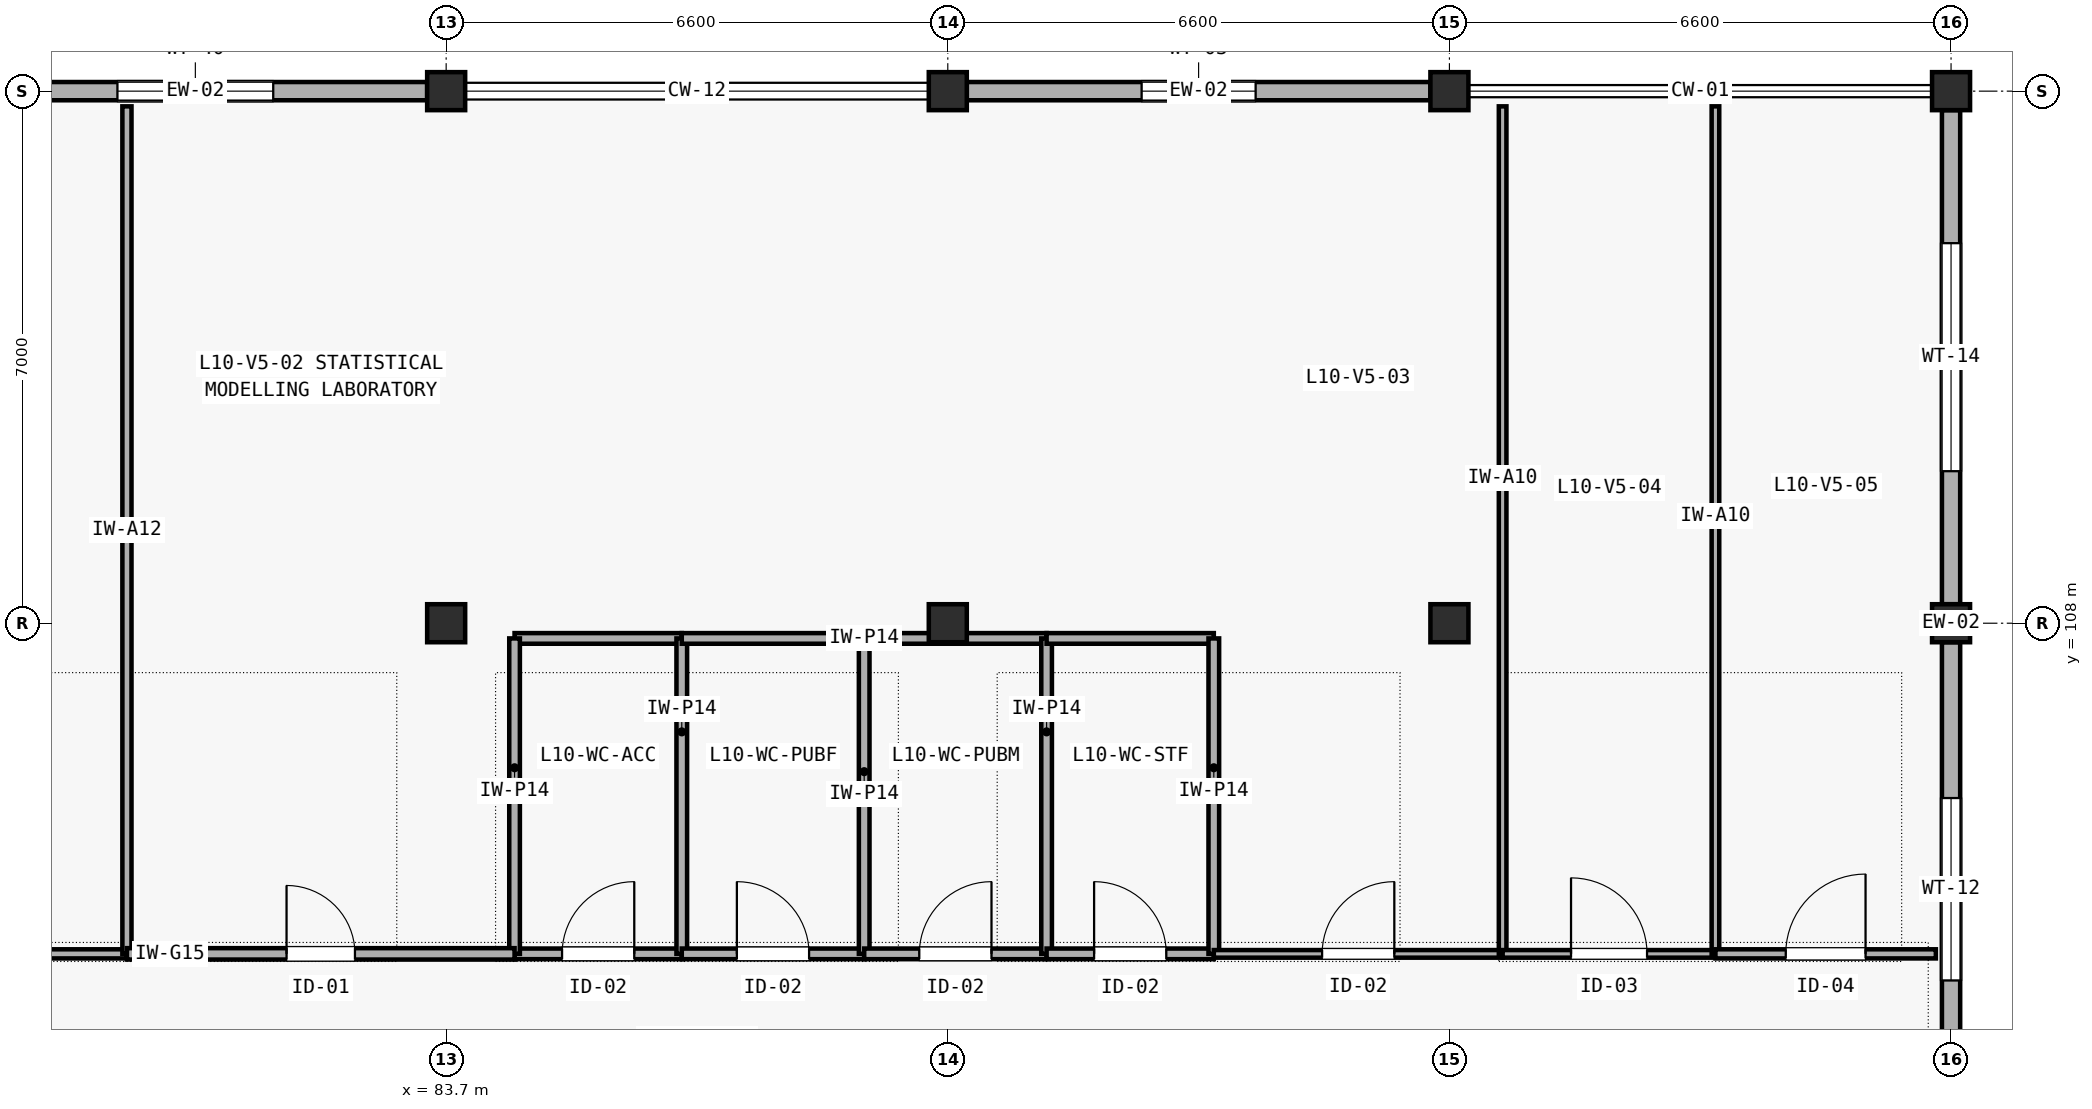
"""IFC4 building model, lengths in metres.
Left out: names, types, materials, properties, quantities, classifications, styles, units other than length and angle.
Written with IfcOpenShell. Run it as: python <this file> out.ifc"""

import sys

from ifc_helpers import new_model, si_unit, direction, frame, frame_2d, origin, origin_2d, place, context, subcontext, project, spatial, rectangle, extrude, element, fill, save


model = new_model("IFC4")
c1 = context("Model", 3, precision=1e-05, world=origin(), true_north=direction((0.0, 1.0)))
c2 = subcontext(c1, "Body", "Model", "MODEL_VIEW")
j1 = project(units=[si_unit("LENGTHUNIT", "METRE"), si_unit("PLANEANGLEUNIT", "RADIAN")], contexts=[c1])
p1 = place(None, origin())
s1 = spatial("IfcSite", under=j1, at=p1, CompositionType="ELEMENT")
p2 = place(p1, origin())
s2 = spatial("IfcBuilding", under=s1, at=p2, CompositionType="ELEMENT")
p3 = place(p2, frame((0.0, 0.0, 42.0)))
s3 = spatial("IfcBuildingStorey", under=s2, at=p3, CompositionType="ELEMENT", Elevation=42.0)
for number, where, z_axis, x_axis in (
    (1, (83.7, 108.0, 0.0), (0.0, 0.0, 1.0), (1.0, 0.0, 0.0)),
    (2, (83.7, 115.0, 0.0), (0.0, 0.0, 1.0), (1.0, 0.0, 0.0)),
    (3, (90.3, 108.0, 0.0), (0.0, 0.0, 1.0), (1.0, 0.0, 0.0)),
    (4, (90.3, 115.0, 0.0), (0.0, 0.0, 1.0), (1.0, 0.0, 0.0)),
    (5, (96.9, 108.0, 0.0), (0.0, 0.0, 1.0), (1.0, 0.0, 0.0)),
    (6, (96.9, 115.0, 0.0), (0.0, 0.0, 1.0), (1.0, 0.0, 0.0)),
    (7, (103.5, 108.0, 0.0), (0.0, 0.0, 1.0), (1.0, 0.0, 0.0)),
    (8, (103.5, 115.0, 0.0), (0.0, 0.0, 1.0), (1.0, 0.0, 0.0)),
):
    element("IfcColumn", number, at=place(p3, frame(where, z_axis=z_axis, x_axis=x_axis)), inside=s3, PredefinedType="COLUMN", context=c2, shape_type="SweptSolid", body=[
        extrude(rectangle(XDim=0.5, YDim=0.5, at=origin_2d()), origin(), (0.0, 0.0, 1.0), 4.2),
    ])
p4 = place(p3, frame((77.35, 115.0, 0.0), z_axis=(0.0, 0.0, 1.0), x_axis=(1.0, 0.0, 0.0)))
e9 = element("IfcWall", 9, at=p4, inside=s3, PredefinedType="SOLIDWALL", context=c2, shape_type="SweptSolid", body=[
    extrude(rectangle(XDim=6.1, YDim=0.24, at=frame_2d((3.05, 0.0))), origin(), (0.0, 0.0, 1.0), 3.385),
])
p5 = place(p4, frame((2.025, 0.0, 0.85)))
e10 = element("IfcOpeningElement", 10, at=p5, cuts=e9, PredefinedType="OPENING", context=c2, shape_type="SweptSolid", body=[
    extrude(rectangle(XDim=2.05, YDim=1.55, at=frame_2d((1.025, 0.775))), frame((0.0, 0.13, 0.0), z_axis=(0.0, -1.0, 0.0), x_axis=(1.0, 0.0, 0.0)), (0.0, 0.0, 1.0), 0.26),
])
p6 = place(p3, frame((90.55, 115.0, 0.0), z_axis=(0.0, 0.0, 1.0), x_axis=(1.0, 0.0, 0.0)))
e11 = element("IfcWall", 11, at=p6, inside=s3, PredefinedType="SOLIDWALL", context=c2, shape_type="SweptSolid", body=[
    extrude(rectangle(XDim=6.1, YDim=0.24, at=frame_2d((3.05, 0.0))), origin(), (0.0, 0.0, 1.0), 3.345),
])
p7 = place(p6, frame((2.3, 0.0, 0.85)))
e12 = element("IfcOpeningElement", 12, at=p7, cuts=e11, PredefinedType="OPENING", context=c2, shape_type="SweptSolid", body=[
    extrude(rectangle(XDim=1.5, YDim=1.35, at=frame_2d((0.75, 0.675))), frame((0.0, 0.13, 0.0), z_axis=(0.0, -1.0, 0.0), x_axis=(1.0, 0.0, 0.0)), (0.0, 0.0, 1.0), 0.26),
])
p8 = place(p3, frame((103.5, 101.25, 0.0), z_axis=(0.0, 0.0, 1.0), x_axis=(0.0, 1.0, 0.0)))
e13 = element("IfcWall", 13, at=p8, inside=s3, PredefinedType="SOLIDWALL", context=c2, shape_type="SweptSolid", body=[
    extrude(rectangle(XDim=6.5, YDim=0.24, at=frame_2d((3.25, 0.0))), origin(), (0.0, 0.0, 1.0), 3.505),
])
p9 = place(p8, frame((2.05, 0.0, 0.85)))
e14 = element("IfcOpeningElement", 14, at=p9, cuts=e13, PredefinedType="OPENING", context=c2, shape_type="SweptSolid", body=[
    extrude(rectangle(XDim=2.4, YDim=1.5, at=frame_2d((1.2, 0.75))), frame((0.0, 0.13, 0.0), z_axis=(0.0, -1.0, 0.0), x_axis=(1.0, 0.0, 0.0)), (0.0, 0.0, 1.0), 0.26),
])
p10 = place(p3, frame((103.5, 108.25, 0.0), z_axis=(0.0, 0.0, 1.0), x_axis=(0.0, 1.0, 0.0)))
e15 = element("IfcWall", 15, at=p10, inside=s3, PredefinedType="SOLIDWALL", context=c2, shape_type="SweptSolid", body=[
    extrude(rectangle(XDim=6.5, YDim=0.24, at=frame_2d((3.25, 0.0))), origin(), (0.0, 0.0, 1.0), 3.505),
])
p11 = place(p10, frame((1.75, 0.0, 0.85)))
e16 = element("IfcOpeningElement", 16, at=p11, cuts=e15, PredefinedType="OPENING", context=c2, shape_type="SweptSolid", body=[
    extrude(rectangle(XDim=3.0, YDim=1.5, at=frame_2d((1.5, 0.75))), frame((0.0, 0.13, 0.0), z_axis=(0.0, -1.0, 0.0), x_axis=(1.0, 0.0, 0.0)), (0.0, 0.0, 1.0), 0.26),
])
p12 = place(p3, frame((84.6, 103.65, 0.0), z_axis=(0.0, 0.0, 1.0), x_axis=(1.0, 0.0, 0.0)))
e17 = element("IfcWall", 17, at=p12, inside=s3, PredefinedType="PLUMBINGWALL", context=c2, shape_type="SweptSolid", body=[
    extrude(rectangle(XDim=2.2, YDim=0.14, at=frame_2d((1.1, 0.0))), origin(), (0.0, 0.0, 1.0), 3.9),
])
p13 = place(p12, frame((0.625, 0.0, 0.0)))
e18 = element("IfcOpeningElement", 18, at=p13, cuts=e17, PredefinedType="OPENING", context=c2, shape_type="SweptSolid", body=[
    extrude(rectangle(XDim=0.95, YDim=2.1, at=frame_2d((0.475, 1.05))), frame((0.0, 0.08, 0.0), z_axis=(0.0, -1.0, 0.0), x_axis=(1.0, 0.0, 0.0)), (0.0, 0.0, 1.0), 0.16),
])
p14 = place(p3, frame((84.6, 107.8, 0.0), z_axis=(0.0, 0.0, 1.0), x_axis=(1.0, 0.0, 0.0)))
e19 = element("IfcWall", 19, at=p14, inside=s3, PredefinedType="PLUMBINGWALL", context=c2, shape_type="SweptSolid", body=[
    extrude(rectangle(XDim=2.2, YDim=0.14, at=frame_2d((1.1, 0.0))), origin(), (0.0, 0.0, 1.0), 3.345),
])
for number, where, z_axis, x_axis in (
    (20, (84.6, 103.65, 0.0), (0.0, 0.0, 1.0), (0.0, 1.0, 0.0)),
    (21, (86.8, 103.65, 0.0), (0.0, 0.0, 1.0), (0.0, 1.0, 0.0)),
):
    element("IfcWall", number, at=place(p3, frame(where, z_axis=z_axis, x_axis=x_axis)), inside=s3, PredefinedType="PLUMBINGWALL", context=c2, shape_type="SweptSolid", body=[
        extrude(rectangle(XDim=4.15, YDim=0.14, at=frame_2d((2.075, 0.0))), origin(), (0.0, 0.0, 1.0), 3.9),
    ])
p15 = place(p3, frame((86.8, 103.65, 0.0), z_axis=(0.0, 0.0, 1.0), x_axis=(1.0, 0.0, 0.0)))
e22 = element("IfcWall", 22, at=p15, inside=s3, PredefinedType="PLUMBINGWALL", context=c2, shape_type="SweptSolid", body=[
    extrude(rectangle(XDim=2.4, YDim=0.14, at=frame_2d((1.2, 0.0))), origin(), (0.0, 0.0, 1.0), 3.9),
])
p16 = place(p15, frame((0.725, 0.0, 0.0)))
e23 = element("IfcOpeningElement", 23, at=p16, cuts=e22, PredefinedType="OPENING", context=c2, shape_type="SweptSolid", body=[
    extrude(rectangle(XDim=0.95, YDim=2.1, at=frame_2d((0.475, 1.05))), frame((0.0, 0.08, 0.0), z_axis=(0.0, -1.0, 0.0), x_axis=(1.0, 0.0, 0.0)), (0.0, 0.0, 1.0), 0.16),
])
p17 = place(p3, frame((86.8, 107.8, 0.0), z_axis=(0.0, 0.0, 1.0), x_axis=(1.0, 0.0, 0.0)))
e24 = element("IfcWall", 24, at=p17, inside=s3, PredefinedType="PLUMBINGWALL", context=c2, shape_type="SweptSolid", body=[
    extrude(rectangle(XDim=2.4, YDim=0.14, at=frame_2d((1.2, 0.0))), origin(), (0.0, 0.0, 1.0), 3.345),
])
p18 = place(p3, frame((89.2, 103.65, 0.0), z_axis=(0.0, 0.0, 1.0), x_axis=(0.0, 1.0, 0.0)))
e25 = element("IfcWall", 25, at=p18, inside=s3, PredefinedType="PLUMBINGWALL", context=c2, shape_type="SweptSolid", body=[
    extrude(rectangle(XDim=4.15, YDim=0.14, at=frame_2d((2.075, 0.0))), origin(), (0.0, 0.0, 1.0), 3.9),
])
p19 = place(p3, frame((89.2, 103.65, 0.0), z_axis=(0.0, 0.0, 1.0), x_axis=(1.0, 0.0, 0.0)))
e26 = element("IfcWall", 26, at=p19, inside=s3, PredefinedType="PLUMBINGWALL", context=c2, shape_type="SweptSolid", body=[
    extrude(rectangle(XDim=2.4, YDim=0.14, at=frame_2d((1.2, 0.0))), origin(), (0.0, 0.0, 1.0), 3.9),
])
p20 = place(p19, frame((0.725, 0.0, 0.0)))
e27 = element("IfcOpeningElement", 27, at=p20, cuts=e26, PredefinedType="OPENING", context=c2, shape_type="SweptSolid", body=[
    extrude(rectangle(XDim=0.95, YDim=2.1, at=frame_2d((0.475, 1.05))), frame((0.0, 0.08, 0.0), z_axis=(0.0, -1.0, 0.0), x_axis=(1.0, 0.0, 0.0)), (0.0, 0.0, 1.0), 0.16),
])
p21 = place(p3, frame((89.2, 107.8, 0.0), z_axis=(0.0, 0.0, 1.0), x_axis=(1.0, 0.0, 0.0)))
e28 = element("IfcWall", 28, at=p21, inside=s3, PredefinedType="PLUMBINGWALL", context=c2, shape_type="SweptSolid", body=[
    extrude(rectangle(XDim=2.4, YDim=0.14, at=frame_2d((1.2, 0.0))), origin(), (0.0, 0.0, 1.0), 3.345),
])
p22 = place(p3, frame((91.6, 103.65, 0.0), z_axis=(0.0, 0.0, 1.0), x_axis=(0.0, 1.0, 0.0)))
e29 = element("IfcWall", 29, at=p22, inside=s3, PredefinedType="PLUMBINGWALL", context=c2, shape_type="SweptSolid", body=[
    extrude(rectangle(XDim=4.15, YDim=0.14, at=frame_2d((2.075, 0.0))), origin(), (0.0, 0.0, 1.0), 3.9),
])
p23 = place(p3, frame((91.6, 103.65, 0.0), z_axis=(0.0, 0.0, 1.0), x_axis=(1.0, 0.0, 0.0)))
e30 = element("IfcWall", 30, at=p23, inside=s3, PredefinedType="PLUMBINGWALL", context=c2, shape_type="SweptSolid", body=[
    extrude(rectangle(XDim=2.2, YDim=0.14, at=frame_2d((1.1, 0.0))), origin(), (0.0, 0.0, 1.0), 3.9),
])
p24 = place(p23, frame((0.625, 0.0, 0.0)))
e31 = element("IfcOpeningElement", 31, at=p24, cuts=e30, PredefinedType="OPENING", context=c2, shape_type="SweptSolid", body=[
    extrude(rectangle(XDim=0.95, YDim=2.1, at=frame_2d((0.475, 1.05))), frame((0.0, 0.08, 0.0), z_axis=(0.0, -1.0, 0.0), x_axis=(1.0, 0.0, 0.0)), (0.0, 0.0, 1.0), 0.16),
])
p25 = place(p3, frame((91.6, 107.8, 0.0), z_axis=(0.0, 0.0, 1.0), x_axis=(1.0, 0.0, 0.0)))
e32 = element("IfcWall", 32, at=p25, inside=s3, PredefinedType="PLUMBINGWALL", context=c2, shape_type="SweptSolid", body=[
    extrude(rectangle(XDim=2.2, YDim=0.14, at=frame_2d((1.1, 0.0))), origin(), (0.0, 0.0, 1.0), 3.345),
])
p26 = place(p3, frame((93.8, 103.65, 0.0), z_axis=(0.0, 0.0, 1.0), x_axis=(0.0, 1.0, 0.0)))
e33 = element("IfcWall", 33, at=p26, inside=s3, PredefinedType="PLUMBINGWALL", context=c2, shape_type="SweptSolid", body=[
    extrude(rectangle(XDim=4.15, YDim=0.14, at=frame_2d((2.075, 0.0))), origin(), (0.0, 0.0, 1.0), 3.9),
])
p27 = place(p3, frame((70.7, 103.65, 0.0), z_axis=(0.0, 0.0, 1.0), x_axis=(1.0, 0.0, 0.0)))
e34 = element("IfcWall", 34, at=p27, inside=s3, PredefinedType="PARTITIONING", context=c2, shape_type="SweptSolid", body=[
    extrude(rectangle(XDim=8.8, YDim=0.12, at=frame_2d((4.4, 0.0))), origin(), (0.0, 0.0, 1.0), 3.9),
])
p28 = place(p27, frame((3.55, 0.0, 0.0)))
e35 = element("IfcOpeningElement", 35, at=p28, cuts=e34, PredefinedType="OPENING", context=c2, shape_type="SweptSolid", body=[
    extrude(rectangle(XDim=1.7, YDim=2.2, at=frame_2d((0.85, 1.1))), frame((0.0, 0.07, 0.0), z_axis=(0.0, -1.0, 0.0), x_axis=(1.0, 0.0, 0.0)), (0.0, 0.0, 1.0), 0.14),
])
p29 = place(p3, frame((79.5, 103.65, 0.0), z_axis=(0.0, 0.0, 1.0), x_axis=(0.0, 1.0, 0.0)))
e36 = element("IfcWall", 36, at=p29, inside=s3, PredefinedType="PARTITIONING", context=c2, shape_type="SweptSolid", body=[
    extrude(rectangle(XDim=11.15, YDim=0.12, at=frame_2d((5.575, 0.0))), origin(), (0.0, 0.0, 1.0), 3.577),
])
p30 = place(p3, frame((79.5, 103.65, 0.0), z_axis=(0.0, 0.0, 1.0), x_axis=(1.0, 0.0, 0.0)))
e37 = element("IfcWall", 37, at=p30, inside=s3, PredefinedType="PARTITIONING", context=c2, shape_type="SweptSolid", body=[
    extrude(rectangle(XDim=5.1, YDim=0.15, at=frame_2d((2.55, 0.0))), origin(), (0.0, 0.0, 1.0), 3.9),
])
p31 = place(p30, frame((2.1, 0.0, 0.0)))
e38 = element("IfcOpeningElement", 38, at=p31, cuts=e37, PredefinedType="OPENING", context=c2, shape_type="SweptSolid", body=[
    extrude(rectangle(XDim=0.9, YDim=2.1, at=frame_2d((0.45, 1.05))), frame((0.0, 0.085, 0.0), z_axis=(0.0, -1.0, 0.0), x_axis=(1.0, 0.0, 0.0)), (0.0, 0.0, 1.0), 0.17),
])
p32 = place(p3, frame((93.8, 103.65, 0.0), z_axis=(0.0, 0.0, 1.0), x_axis=(1.0, 0.0, 0.0)))
e39 = element("IfcWall", 39, at=p32, inside=s3, PredefinedType="PARTITIONING", context=c2, shape_type="SweptSolid", body=[
    extrude(rectangle(XDim=3.8, YDim=0.1, at=frame_2d((1.9, 0.0))), origin(), (0.0, 0.0, 1.0), 3.9),
])
p33 = place(p32, frame((1.425, 0.0, 0.0)))
e40 = element("IfcOpeningElement", 40, at=p33, cuts=e39, PredefinedType="OPENING", context=c2, shape_type="SweptSolid", body=[
    extrude(rectangle(XDim=0.95, YDim=2.1, at=frame_2d((0.475, 1.05))), frame((0.0, 0.06, 0.0), z_axis=(0.0, -1.0, 0.0), x_axis=(1.0, 0.0, 0.0)), (0.0, 0.0, 1.0), 0.12),
])
p34 = place(p3, frame((97.6, 103.65, 0.0), z_axis=(0.0, 0.0, 1.0), x_axis=(0.0, 1.0, 0.0)))
e41 = element("IfcWall", 41, at=p34, inside=s3, PredefinedType="PARTITIONING", context=c2, shape_type="SweptSolid", body=[
    extrude(rectangle(XDim=11.15, YDim=0.1, at=frame_2d((5.575, 0.0))), origin(), (0.0, 0.0, 1.0), 3.9),
])
p35 = place(p3, frame((97.6, 103.65, 0.0), z_axis=(0.0, 0.0, 1.0), x_axis=(1.0, 0.0, 0.0)))
e42 = element("IfcWall", 42, at=p35, inside=s3, PredefinedType="PARTITIONING", context=c2, shape_type="SweptSolid", body=[
    extrude(rectangle(XDim=2.8, YDim=0.1, at=frame_2d((1.4, 0.0))), origin(), (0.0, 0.0, 1.0), 3.9),
])
p36 = place(p35, frame((0.9, 0.0, 0.0)))
e43 = element("IfcOpeningElement", 43, at=p36, cuts=e42, PredefinedType="OPENING", context=c2, shape_type="SweptSolid", body=[
    extrude(rectangle(XDim=1.0, YDim=2.1, at=frame_2d((0.5, 1.05))), frame((0.0, 0.06, 0.0), z_axis=(0.0, -1.0, 0.0), x_axis=(1.0, 0.0, 0.0)), (0.0, 0.0, 1.0), 0.12),
])
p37 = place(p3, frame((100.4, 103.65, 0.0), z_axis=(0.0, 0.0, 1.0), x_axis=(0.0, 1.0, 0.0)))
e44 = element("IfcWall", 44, at=p37, inside=s3, PredefinedType="PARTITIONING", context=c2, shape_type="SweptSolid", body=[
    extrude(rectangle(XDim=11.15, YDim=0.1, at=frame_2d((5.575, 0.0))), origin(), (0.0, 0.0, 1.0), 3.9),
])
p38 = place(p3, frame((100.4, 103.65, 0.0), z_axis=(0.0, 0.0, 1.0), x_axis=(1.0, 0.0, 0.0)))
e45 = element("IfcWall", 45, at=p38, inside=s3, PredefinedType="PARTITIONING", context=c2, shape_type="SweptSolid", body=[
    extrude(rectangle(XDim=2.9, YDim=0.12, at=frame_2d((1.45, 0.0))), origin(), (0.0, 0.0, 1.0), 3.9),
])
p39 = place(p38, frame((0.925, 0.0, 0.0)))
e46 = element("IfcOpeningElement", 46, at=p39, cuts=e45, PredefinedType="OPENING", context=c2, shape_type="SweptSolid", body=[
    extrude(rectangle(XDim=1.05, YDim=2.15, at=frame_2d((0.525, 1.075))), frame((0.0, 0.07, 0.0), z_axis=(0.0, -1.0, 0.0), x_axis=(1.0, 0.0, 0.0)), (0.0, 0.0, 1.0), 0.14),
])
p40 = place(p5, origin())
e47 = element("IfcWindow", 47, at=p40, inside=s3, PartitioningType="SINGLE_PANEL", PredefinedType="WINDOW", context=c2, shape_type="SweptSolid", body=[
    extrude(rectangle(XDim=2.05, YDim=1.55, at=frame_2d((1.025, 0.775))), frame((0.0, 0.03, 0.0), z_axis=(0.0, -1.0, 0.0), x_axis=(1.0, 0.0, 0.0)), (0.0, 0.0, 1.0), 0.06),
])
fill(e10, e47)
p41 = place(p7, origin())
e48 = element("IfcWindow", 48, at=p41, inside=s3, PartitioningType="SINGLE_PANEL", PredefinedType="WINDOW", context=c2, shape_type="SweptSolid", body=[
    extrude(rectangle(XDim=1.5, YDim=1.35, at=frame_2d((0.75, 0.675))), frame((0.0, 0.03, 0.0), z_axis=(0.0, -1.0, 0.0), x_axis=(1.0, 0.0, 0.0)), (0.0, 0.0, 1.0), 0.06),
])
fill(e12, e48)
p42 = place(p9, origin())
e49 = element("IfcWindow", 49, at=p42, inside=s3, PartitioningType="SINGLE_PANEL", PredefinedType="WINDOW", context=c2, shape_type="SweptSolid", body=[
    extrude(rectangle(XDim=2.4, YDim=1.5, at=frame_2d((1.2, 0.75))), frame((0.0, 0.03, 0.0), z_axis=(0.0, -1.0, 0.0), x_axis=(1.0, 0.0, 0.0)), (0.0, 0.0, 1.0), 0.06),
])
fill(e14, e49)
p43 = place(p11, origin())
e50 = element("IfcWindow", 50, at=p43, inside=s3, PartitioningType="SINGLE_PANEL", PredefinedType="WINDOW", context=c2, shape_type="SweptSolid", body=[
    extrude(rectangle(XDim=3.0, YDim=1.5, at=frame_2d((1.5, 0.75))), frame((0.0, 0.03, 0.0), z_axis=(0.0, -1.0, 0.0), x_axis=(1.0, 0.0, 0.0)), (0.0, 0.0, 1.0), 0.06),
])
fill(e16, e50)
p44 = place(p13, origin())
e51 = element("IfcDoor", 51, at=p44, inside=s3, OperationType="SINGLE_SWING_RIGHT", PredefinedType="DOOR", context=c2, shape_type="SweptSolid", body=[
    extrude(rectangle(XDim=0.95, YDim=2.1, at=frame_2d((0.475, 1.05))), frame((0.0, 0.025, 0.0), z_axis=(0.0, -1.0, 0.0), x_axis=(1.0, 0.0, 0.0)), (0.0, 0.0, 1.0), 0.05),
])
fill(e18, e51)
p45 = place(p16, origin())
e52 = element("IfcDoor", 52, at=p45, inside=s3, OperationType="SINGLE_SWING_LEFT", PredefinedType="DOOR", context=c2, shape_type="SweptSolid", body=[
    extrude(rectangle(XDim=0.95, YDim=2.1, at=frame_2d((0.475, 1.05))), frame((0.0, 0.025, 0.0), z_axis=(0.0, -1.0, 0.0), x_axis=(1.0, 0.0, 0.0)), (0.0, 0.0, 1.0), 0.05),
])
fill(e23, e52)
p46 = place(p20, origin())
e53 = element("IfcDoor", 53, at=p46, inside=s3, OperationType="SINGLE_SWING_RIGHT", PredefinedType="DOOR", context=c2, shape_type="SweptSolid", body=[
    extrude(rectangle(XDim=0.95, YDim=2.1, at=frame_2d((0.475, 1.05))), frame((0.0, 0.025, 0.0), z_axis=(0.0, -1.0, 0.0), x_axis=(1.0, 0.0, 0.0)), (0.0, 0.0, 1.0), 0.05),
])
fill(e27, e53)
p47 = place(p24, origin())
e54 = element("IfcDoor", 54, at=p47, inside=s3, OperationType="SINGLE_SWING_LEFT", PredefinedType="DOOR", context=c2, shape_type="SweptSolid", body=[
    extrude(rectangle(XDim=0.95, YDim=2.1, at=frame_2d((0.475, 1.05))), frame((0.0, 0.025, 0.0), z_axis=(0.0, -1.0, 0.0), x_axis=(1.0, 0.0, 0.0)), (0.0, 0.0, 1.0), 0.05),
])
fill(e31, e54)
p48 = place(p31, origin())
e55 = element("IfcDoor", 55, at=p48, inside=s3, OperationType="SINGLE_SWING_LEFT", PredefinedType="DOOR", context=c2, shape_type="SweptSolid", body=[
    extrude(rectangle(XDim=0.9, YDim=2.1, at=frame_2d((0.45, 1.05))), frame((0.0, 0.025, 0.0), z_axis=(0.0, -1.0, 0.0), x_axis=(1.0, 0.0, 0.0)), (0.0, 0.0, 1.0), 0.05),
])
fill(e38, e55)
p49 = place(p33, origin())
e56 = element("IfcDoor", 56, at=p49, inside=s3, OperationType="SINGLE_SWING_RIGHT", PredefinedType="DOOR", context=c2, shape_type="SweptSolid", body=[
    extrude(rectangle(XDim=0.95, YDim=2.1, at=frame_2d((0.475, 1.05))), frame((0.0, 0.025, 0.0), z_axis=(0.0, -1.0, 0.0), x_axis=(1.0, 0.0, 0.0)), (0.0, 0.0, 1.0), 0.05),
])
fill(e40, e56)
p50 = place(p36, origin())
e57 = element("IfcDoor", 57, at=p50, inside=s3, OperationType="SINGLE_SWING_LEFT", PredefinedType="DOOR", context=c2, shape_type="SweptSolid", body=[
    extrude(rectangle(XDim=1.0, YDim=2.1, at=frame_2d((0.5, 1.05))), frame((0.0, 0.025, 0.0), z_axis=(0.0, -1.0, 0.0), x_axis=(1.0, 0.0, 0.0)), (0.0, 0.0, 1.0), 0.05),
])
fill(e43, e57)
p51 = place(p39, origin())
e58 = element("IfcDoor", 58, at=p51, inside=s3, OperationType="SINGLE_SWING_RIGHT", PredefinedType="DOOR", context=c2, shape_type="SweptSolid", body=[
    extrude(rectangle(XDim=1.05, YDim=2.15, at=frame_2d((0.525, 1.075))), frame((0.0, 0.025, 0.0), z_axis=(0.0, -1.0, 0.0), x_axis=(1.0, 0.0, 0.0)), (0.0, 0.0, 1.0), 0.05),
])
fill(e46, e58)
save(model, sys.argv[1])
